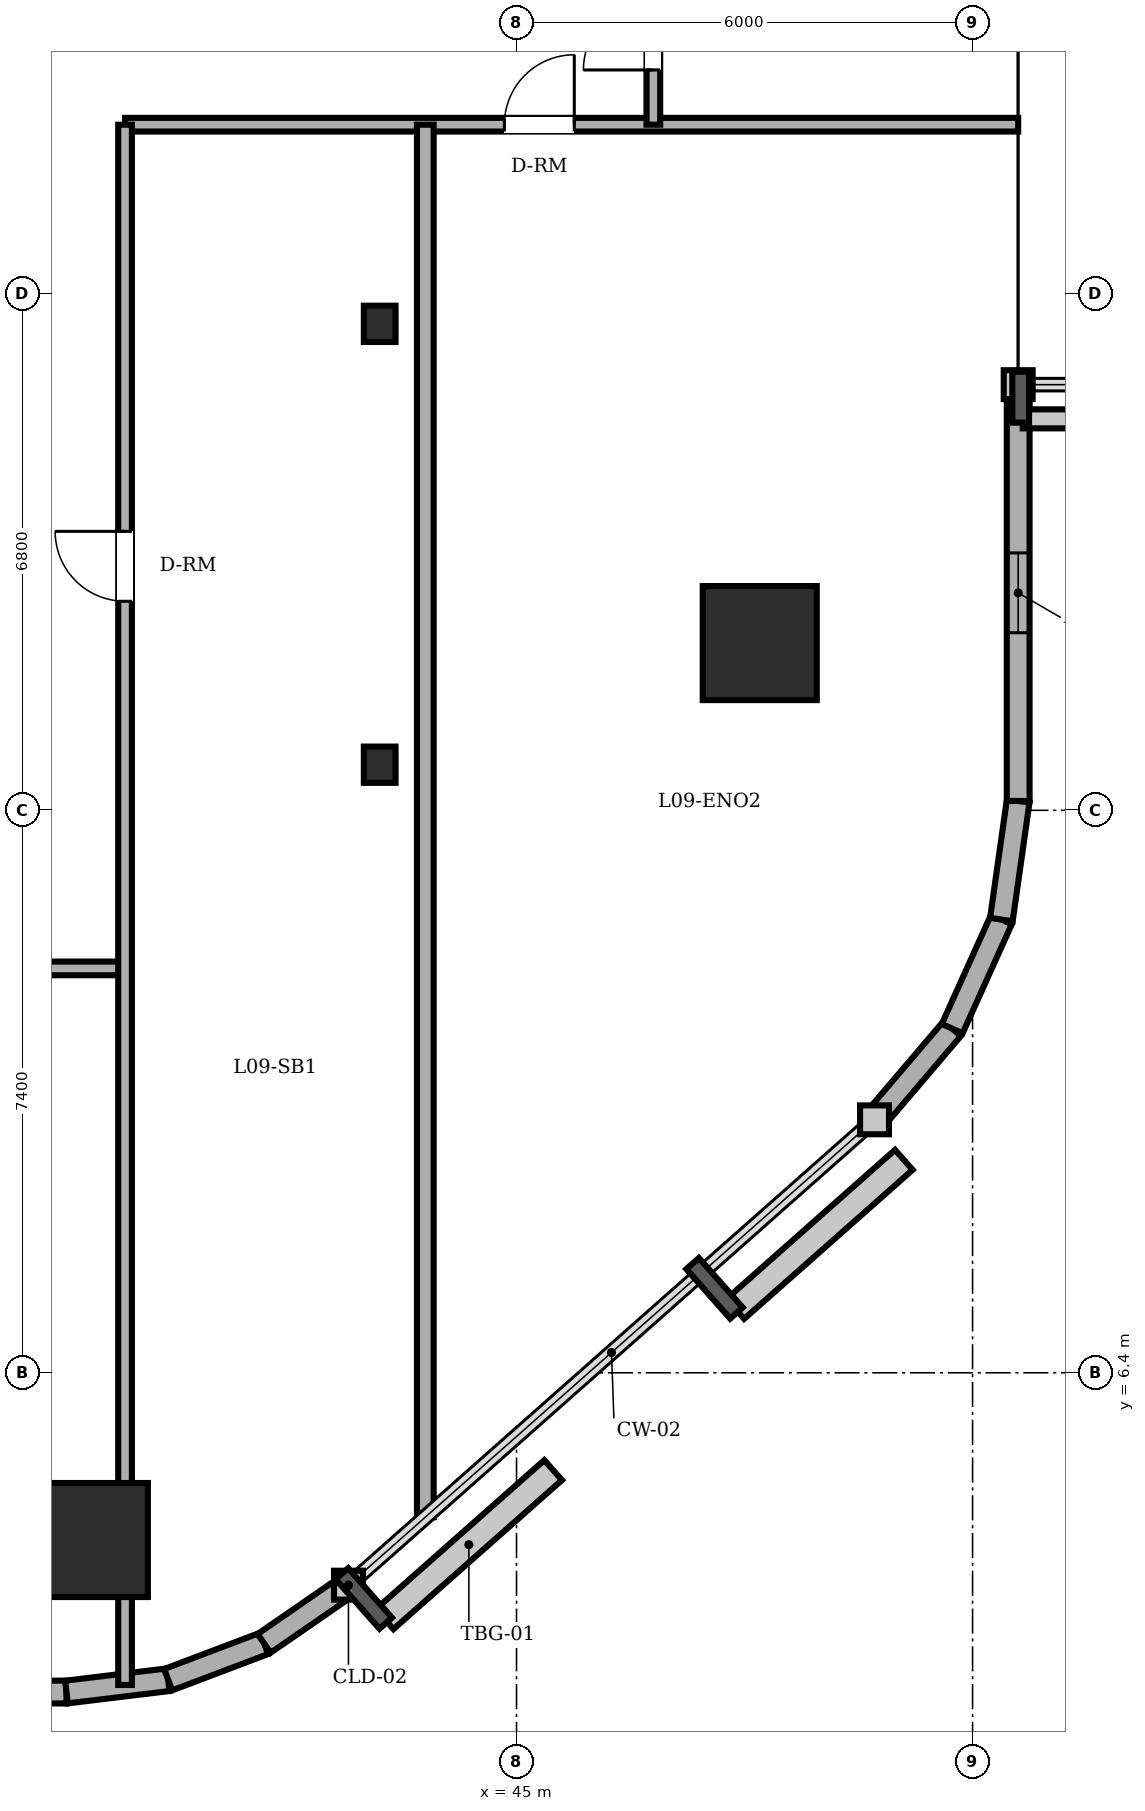
"""IFC4 building model, lengths in metres.
Left out: names, types, materials, properties, quantities, classifications, styles, units other than length and angle.
Written with IfcOpenShell. Run it as: python <this file> out.ifc"""

import sys

from ifc_helpers import new_model, si_unit, direction, frame, frame_2d, origin, origin_2d, place, context, subcontext, project, spatial, rectangle, circle, i_section, extrude, element, fill, save


model = new_model("IFC4")
c1 = context("Model", 3, precision=1e-05, world=origin(), true_north=direction((0.0, 1.0)))
c2 = subcontext(c1, "Body", "Model", "MODEL_VIEW")
j1 = project(units=[si_unit("LENGTHUNIT", "METRE"), si_unit("PLANEANGLEUNIT", "RADIAN")], contexts=[c1])
p1 = place(None, origin())
s1 = spatial("IfcSite", under=j1, at=p1, CompositionType="ELEMENT")
p2 = place(p1, origin())
s2 = spatial("IfcBuilding", under=s1, at=p2, CompositionType="ELEMENT")
p3 = place(p2, frame((0.0, 0.0, 36.0)))
s3 = spatial("IfcBuildingStorey", under=s2, at=p3, CompositionType="ELEMENT", Elevation=36.0)
for number, where, z_axis, x_axis in (
    (1, (39.4, 4.2, 0.0), (0.0, 0.0, 1.0), (1.0, 0.0, 0.0)),
    (2, (48.2, 16.0, 0.0), (0.0, 0.0, 1.0), (1.0, 0.0, 0.0)),
):
    element("IfcColumn", number, at=place(p3, frame(where, z_axis=z_axis, x_axis=x_axis)), inside=s3, PredefinedType="COLUMN", context=c2, shape_type="SweptSolid", body=[
        extrude(circle(Radius=0.75, at=origin_2d()), origin(), (0.0, 0.0, 1.0), 3.6),
    ])
for number, where, z_axis, x_axis in (
    (3, (43.2, 14.4, 0.0), (0.0, 0.0, 1.0), (1.0, 0.0, 0.0)),
    (4, (43.2, 20.2, 0.0), (0.0, 0.0, 1.0), (1.0, 0.0, 0.0)),
):
    element("IfcColumn", number, at=place(p3, frame(where, z_axis=z_axis, x_axis=x_axis)), inside=s3, PredefinedType="COLUMN", context=c2, shape_type="SweptSolid", body=[
        extrude(i_section(OverallWidth=0.417, OverallDepth=0.477, WebThickness=0.036, FlangeThickness=0.057, FilletRadius=0.015, at=origin_2d()), origin(), (0.0, 0.0, 1.0), 3.6),
    ])
p4 = place(p3, frame((9.0, 2.2, 0.0), z_axis=(0.0, 0.0, 1.0), x_axis=(1.0, 0.0, 0.0)))
e5 = element("IfcWall", 5, at=p4, inside=s3, PredefinedType="SOLIDWALL", context=c2, shape_type="SweptSolid", body=[
    extrude(rectangle(XDim=30.079, YDim=0.3, at=frame_2d((15.04, 0.0))), origin(), (0.0, 0.0, 1.0), 3.4),
])
p5 = place(p4, frame((4.825, 0.0, 0.0)))
e6 = element("IfcOpeningElement", 6, at=p5, cuts=e5, PredefinedType="OPENING", context=c2, shape_type="SweptSolid", body=[
    extrude(rectangle(XDim=0.95, YDim=2.2, at=frame_2d((0.475, 1.1))), frame((0.0, 0.16, 0.0), z_axis=(0.0, -1.0, 0.0), x_axis=(1.0, 0.0, 0.0)), (0.0, 0.0, 1.0), 0.32),
])
p6 = place(p4, frame((9.45, 0.0, 0.85)))
e7 = element("IfcOpeningElement", 7, at=p6, cuts=e5, PredefinedType="OPENING", context=c2, shape_type="SweptSolid", body=[
    extrude(rectangle(XDim=1.8, YDim=1.55, at=frame_2d((0.9, 0.775))), frame((0.0, 0.16, 0.0), z_axis=(0.0, -1.0, 0.0), x_axis=(1.0, 0.0, 0.0)), (0.0, 0.0, 1.0), 0.32),
])
p7 = place(p4, frame((15.2, 0.0, 0.85)))
e8 = element("IfcOpeningElement", 8, at=p7, cuts=e5, PredefinedType="OPENING", context=c2, shape_type="SweptSolid", body=[
    extrude(rectangle(XDim=1.8, YDim=1.55, at=frame_2d((0.9, 0.775))), frame((0.0, 0.16, 0.0), z_axis=(0.0, -1.0, 0.0), x_axis=(1.0, 0.0, 0.0)), (0.0, 0.0, 1.0), 0.32),
])
p8 = place(p4, frame((21.01, 0.0, 0.85)))
e9 = element("IfcOpeningElement", 9, at=p8, cuts=e5, PredefinedType="OPENING", context=c2, shape_type="SweptSolid", body=[
    extrude(rectangle(XDim=1.8, YDim=1.55, at=frame_2d((0.9, 0.775))), frame((0.0, 0.16, 0.0), z_axis=(0.0, -1.0, 0.0), x_axis=(1.0, 0.0, 0.0)), (0.0, 0.0, 1.0), 0.32),
])
p9 = place(p4, frame((24.919, 0.0, 0.85)))
e10 = element("IfcOpeningElement", 10, at=p9, cuts=e5, PredefinedType="OPENING", context=c2, shape_type="SweptSolid", body=[
    extrude(rectangle(XDim=1.8, YDim=1.55, at=frame_2d((0.9, 0.775))), frame((0.0, 0.16, 0.0), z_axis=(0.0, -1.0, 0.0), x_axis=(1.0, 0.0, 0.0)), (0.0, 0.0, 1.0), 0.32),
])
p10 = place(p3, frame((39.079, 2.2, 0.0), z_axis=(0.0, 0.0, 1.0), x_axis=(0.992739027259, 0.120288086515, 0.0)))
e11 = element("IfcWall", 11, at=p10, inside=s3, PredefinedType="SOLIDWALL", context=c2, shape_type="SweptSolid", body=[
    extrude(rectangle(XDim=1.348, YDim=0.3, at=frame_2d((0.674, 0.0))), origin(), (0.0, 0.0, 1.0), 3.4),
])
p11 = place(p3, frame((40.417, 2.362, 0.0), z_axis=(0.0, 0.0, 1.0), x_axis=(0.935156721165, 0.354234254216, 0.0)))
e12 = element("IfcWall", 12, at=p11, inside=s3, PredefinedType="SOLIDWALL", context=c2, shape_type="SweptSolid", body=[
    extrude(rectangle(XDim=1.349, YDim=0.3, at=frame_2d((0.675, 0.0))), origin(), (0.0, 0.0, 1.0), 3.4),
])
p12 = place(p3, frame((41.679, 2.84, 0.0), z_axis=(0.0, 0.0, 1.0), x_axis=(0.823116500192, 0.567872544777, 0.0)))
e13 = element("IfcWall", 13, at=p12, inside=s3, PredefinedType="SOLIDWALL", context=c2, shape_type="SweptSolid", body=[
    extrude(rectangle(XDim=1.349, YDim=0.3, at=frame_2d((0.674, 0.0))), origin(), (0.0, 0.0, 1.0), 3.4),
])
p13 = place(p3, frame((49.71, 9.728, 0.0), z_axis=(0.0, 0.0, 1.0), x_axis=(0.648389989909, 0.7613083613, 0.0)))
e14 = element("IfcWall", 14, at=p13, inside=s3, PredefinedType="SOLIDWALL", context=c2, shape_type="SweptSolid", body=[
    extrude(rectangle(XDim=1.576, YDim=0.3, at=frame_2d((0.788, 0.0))), origin(), (0.0, 0.0, 1.0), 3.4),
])
p14 = place(p3, frame((50.732, 10.928, 0.0), z_axis=(0.0, 0.0, 1.0), x_axis=(0.410996558744, 0.911636895206, 0.0)))
e15 = element("IfcWall", 15, at=p14, inside=s3, PredefinedType="SOLIDWALL", context=c2, shape_type="SweptSolid", body=[
    extrude(rectangle(XDim=1.574, YDim=0.3, at=frame_2d((0.787, 0.0))), origin(), (0.0, 0.0, 1.0), 3.4),
])
p15 = place(p3, frame((51.379, 12.363, 0.0), z_axis=(0.0, 0.0, 1.0), x_axis=(0.140380048512, 0.990097693149, 0.0)))
e16 = element("IfcWall", 16, at=p15, inside=s3, PredefinedType="SOLIDWALL", context=c2, shape_type="SweptSolid", body=[
    extrude(rectangle(XDim=1.576, YDim=0.3, at=frame_2d((0.788, 0.0))), origin(), (0.0, 0.0, 1.0), 3.4),
])
p16 = place(p3, frame((51.6, 13.923, 0.0), z_axis=(0.0, 0.0, 1.0), x_axis=(0.0, 1.0, 0.0)))
e17 = element("IfcWall", 17, at=p16, inside=s3, PredefinedType="SOLIDWALL", context=c2, shape_type="SweptSolid", body=[
    extrude(rectangle(XDim=5.477, YDim=0.3, at=frame_2d((2.738, 0.0))), origin(), (0.0, 0.0, 1.0), 3.4),
])
p17 = place(p16, frame((2.213, 0.0, 0.85)))
e18 = element("IfcOpeningElement", 18, at=p17, cuts=e17, PredefinedType="OPENING", context=c2, shape_type="SweptSolid", body=[
    extrude(rectangle(XDim=1.05, YDim=1.55, at=frame_2d((0.525, 0.775))), frame((0.0, 0.16, 0.0), z_axis=(0.0, -1.0, 0.0), x_axis=(1.0, 0.0, 0.0)), (0.0, 0.0, 1.0), 0.32),
])
p18 = place(p3, frame((3.4, 11.72, 0.0), z_axis=(0.0, 0.0, 1.0), x_axis=(1.0, 0.0, 0.0)))
e19 = element("IfcWall", 19, at=p18, inside=s3, PredefinedType="PARTITIONING", context=c2, shape_type="SweptSolid", body=[
    extrude(rectangle(XDim=36.45, YDim=0.18, at=frame_2d((18.225, 0.0))), origin(), (0.0, 0.0, 1.0), 3.4),
])
p19 = place(p18, frame((21.24, 0.0, 0.0)))
e20 = element("IfcOpeningElement", 20, at=p19, cuts=e19, PredefinedType="OPENING", context=c2, shape_type="SweptSolid", body=[
    extrude(rectangle(XDim=0.92, YDim=2.1, at=frame_2d((0.46, 1.05))), frame((0.0, 0.1, 0.0), z_axis=(0.0, -1.0, 0.0), x_axis=(1.0, 0.0, 0.0)), (0.0, 0.0, 1.0), 0.2),
])
p20 = place(p18, frame((4.925, 0.0, 0.0)))
e21 = element("IfcOpeningElement", 21, at=p20, cuts=e19, PredefinedType="OPENING", context=c2, shape_type="SweptSolid", body=[
    extrude(rectangle(XDim=1.0, YDim=2.15, at=frame_2d((0.5, 1.075))), frame((0.0, 0.1, 0.0), z_axis=(0.0, -1.0, 0.0), x_axis=(1.0, 0.0, 0.0)), (0.0, 0.0, 1.0), 0.2),
])
p21 = place(p18, frame((13.525, 0.0, 0.0)))
e22 = element("IfcOpeningElement", 22, at=p21, cuts=e19, PredefinedType="OPENING", context=c2, shape_type="SweptSolid", body=[
    extrude(rectangle(XDim=1.0, YDim=2.15, at=frame_2d((0.5, 1.075))), frame((0.0, 0.1, 0.0), z_axis=(0.0, -1.0, 0.0), x_axis=(1.0, 0.0, 0.0)), (0.0, 0.0, 1.0), 0.2),
])
p22 = place(p18, frame((29.305, 0.0, 0.0)))
e23 = element("IfcOpeningElement", 23, at=p22, cuts=e19, PredefinedType="OPENING", context=c2, shape_type="SweptSolid", body=[
    extrude(rectangle(XDim=0.92, YDim=2.1, at=frame_2d((0.46, 1.05))), frame((0.0, 0.1, 0.0), z_axis=(0.0, -1.0, 0.0), x_axis=(1.0, 0.0, 0.0)), (0.0, 0.0, 1.0), 0.2),
])
p23 = place(p3, frame((39.85, 22.82, 0.0), z_axis=(0.0, 0.0, 1.0), x_axis=(1.0, 0.0, 0.0)))
e24 = element("IfcWall", 24, at=p23, inside=s3, PredefinedType="PARTITIONING", context=c2, shape_type="SweptSolid", body=[
    extrude(rectangle(XDim=11.75, YDim=0.18, at=frame_2d((5.875, 0.0))), origin(), (0.0, 0.0, 1.0), 3.4),
])
p24 = place(p23, frame((4.99, 0.0, 0.0)))
e25 = element("IfcOpeningElement", 25, at=p24, cuts=e24, PredefinedType="OPENING", context=c2, shape_type="SweptSolid", body=[
    extrude(rectangle(XDim=0.92, YDim=2.1, at=frame_2d((0.46, 1.05))), frame((0.0, 0.1, 0.0), z_axis=(0.0, -1.0, 0.0), x_axis=(1.0, 0.0, 0.0)), (0.0, 0.0, 1.0), 0.2),
])
p25 = place(p3, frame((39.85, 2.293, 0.0), z_axis=(0.0, 0.0, 1.0), x_axis=(0.0, 1.0, 0.0)))
e26 = element("IfcWall", 26, at=p25, inside=s3, PredefinedType="PARTITIONING", context=c2, shape_type="SweptSolid", body=[
    extrude(rectangle(XDim=20.527, YDim=0.18, at=frame_2d((10.264, 0.0))), origin(), (0.0, 0.0, 1.0), 2.782),
])
p26 = place(p25, frame((14.257, 0.0, 0.0)))
e27 = element("IfcOpeningElement", 27, at=p26, cuts=e26, PredefinedType="OPENING", context=c2, shape_type="SweptSolid", body=[
    extrude(rectangle(XDim=0.92, YDim=2.1, at=frame_2d((0.46, 1.05))), frame((0.0, 0.1, 0.0), z_axis=(0.0, -1.0, 0.0), x_axis=(1.0, 0.0, 0.0)), (0.0, 0.0, 1.0), 0.2),
])
p27 = place(p3, frame((43.8, 4.5, 0.0), z_axis=(0.0, 0.0, 1.0), x_axis=(0.0, 1.0, 0.0)))
e28 = element("IfcWall", 28, at=p27, inside=s3, PredefinedType="PARTITIONING", context=c2, shape_type="SweptSolid", body=[
    extrude(rectangle(XDim=18.32, YDim=0.22, at=frame_2d((9.16, 0.0))), origin(), (0.0, 0.0, 1.0), 3.4),
])
p28 = place(p3, frame((46.8, 22.82, 0.0), z_axis=(0.0, 0.0, 1.0), x_axis=(0.0, 1.0, 0.0)))
e29 = element("IfcWall", 29, at=p28, inside=s3, PredefinedType="PARTITIONING", context=c2, shape_type="SweptSolid", body=[
    extrude(rectangle(XDim=2.36, YDim=0.18, at=frame_2d((1.18, 0.0))), origin(), (0.0, 0.0, 1.0), 3.4),
])
p29 = place(p28, frame((0.72, 0.0, 0.0)))
e30 = element("IfcOpeningElement", 30, at=p29, cuts=e29, PredefinedType="OPENING", context=c2, shape_type="SweptSolid", body=[
    extrude(rectangle(XDim=0.92, YDim=2.1, at=frame_2d((0.46, 1.05))), frame((0.0, 0.1, 0.0), z_axis=(0.0, -1.0, 0.0), x_axis=(1.0, 0.0, 0.0)), (0.0, 0.0, 1.0), 0.2),
])
p30 = place(p17, origin())
e31 = element("IfcWindow", 31, at=p30, inside=s3, PartitioningType="SINGLE_PANEL", PredefinedType="WINDOW", context=c2, shape_type="SweptSolid", body=[
    extrude(rectangle(XDim=1.05, YDim=1.55, at=frame_2d((0.525, 0.775))), frame((0.0, 0.03, 0.0), z_axis=(0.0, -1.0, 0.0), x_axis=(1.0, 0.0, 0.0)), (0.0, 0.0, 1.0), 0.06),
])
fill(e18, e31)
p31 = place(p26, origin())
e32 = element("IfcDoor", 32, at=p31, inside=s3, OperationType="SINGLE_SWING_RIGHT", PredefinedType="DOOR", context=c2, shape_type="SweptSolid", body=[
    extrude(rectangle(XDim=0.92, YDim=2.1, at=frame_2d((0.46, 1.05))), frame((0.0, 0.025, 0.0), z_axis=(0.0, -1.0, 0.0), x_axis=(1.0, 0.0, 0.0)), (0.0, 0.0, 1.0), 0.05),
])
fill(e27, e32)
p32 = place(p24, origin())
e33 = element("IfcDoor", 33, at=p32, inside=s3, OperationType="SINGLE_SWING_RIGHT", PredefinedType="DOOR", context=c2, shape_type="SweptSolid", body=[
    extrude(rectangle(XDim=0.92, YDim=2.1, at=frame_2d((0.46, 1.05))), frame((0.0, 0.025, 0.0), z_axis=(0.0, -1.0, 0.0), x_axis=(1.0, 0.0, 0.0)), (0.0, 0.0, 1.0), 0.05),
])
fill(e25, e33)
p33 = place(p29, origin())
e34 = element("IfcDoor", 34, at=p33, inside=s3, OperationType="SINGLE_SWING_LEFT", PredefinedType="DOOR", context=c2, shape_type="SweptSolid", body=[
    extrude(rectangle(XDim=0.92, YDim=2.1, at=frame_2d((0.46, 1.05))), frame((0.0, 0.025, 0.0), z_axis=(0.0, -1.0, 0.0), x_axis=(1.0, 0.0, 0.0)), (0.0, 0.0, 1.0), 0.05),
])
fill(e30, e34)
save(model, sys.argv[1])
